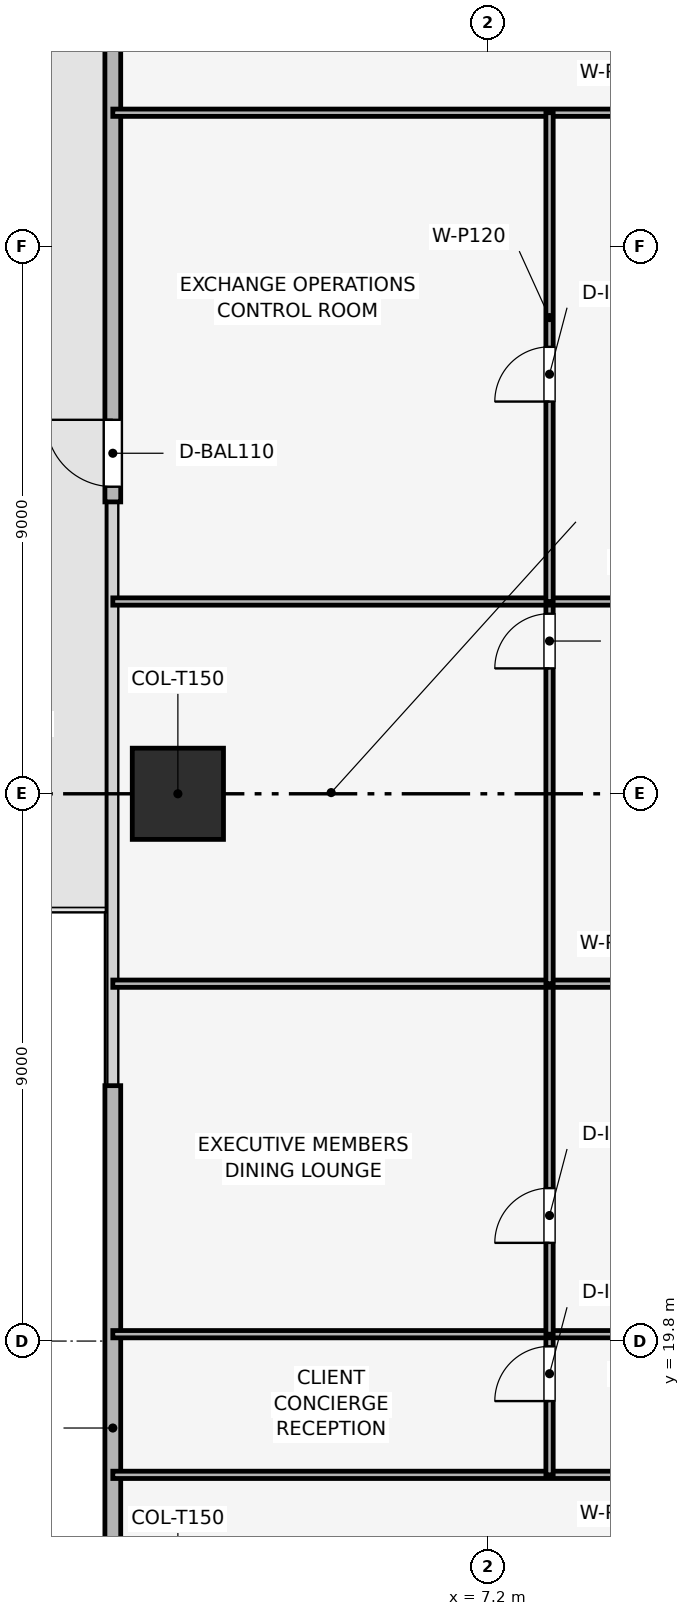
"""IFC4 building model, lengths in metres.
Left out: names, types, materials, properties, quantities, classifications, styles, units other than length and angle.
Written with IfcOpenShell. Run it as: python <this file> out.ifc"""

import sys

from ifc_helpers import new_model, si_unit, direction, frame, frame_2d, origin, origin_2d, place, context, subcontext, project, spatial, rectangle, extrude, element, fill, save


model = new_model("IFC4")
c1 = context("Model", 3, precision=1e-05, world=origin(), true_north=direction((0.0, 1.0)))
c2 = subcontext(c1, "Body", "Model", "MODEL_VIEW")
j1 = project(units=[si_unit("LENGTHUNIT", "METRE"), si_unit("PLANEANGLEUNIT", "RADIAN")], contexts=[c1])
p1 = place(None, origin())
s1 = spatial("IfcSite", under=j1, at=p1, CompositionType="ELEMENT")
p2 = place(p1, origin())
s2 = spatial("IfcBuilding", under=s1, at=p2, CompositionType="ELEMENT")
p3 = place(p2, frame((0.0, 0.0, 53.4)))
s3 = spatial("IfcBuildingStorey", under=s2, at=p3, CompositionType="ELEMENT", Elevation=53.4)
p4 = place(p3, frame((2.1, 28.8, 0.003), z_axis=(0.0, 0.0, 1.0), x_axis=(1.0, 0.0, 0.0)))
e1 = element("IfcColumn", 1, at=p4, inside=s3, PredefinedType="COLUMN", context=c2, shape_type="SweptSolid", body=[
    extrude(rectangle(XDim=1.5, YDim=1.5, at=origin_2d()), origin(), (0.0, 0.0, 1.0), 3.644),
])
p5 = place(p3, frame((1.03, 8.7, 0.0), z_axis=(0.0, 0.0, 1.0), x_axis=(0.0, 1.0, 0.0)))
e2 = element("IfcWall", 2, at=p5, inside=s3, PredefinedType="SOLIDWALL", context=c2, shape_type="SweptSolid", body=[
    extrude(rectangle(XDim=15.3, YDim=0.26, at=frame_2d((7.65, 0.0))), origin(), (0.0, 0.0, 1.0), 3.65),
])
p6 = place(p5, frame((0.25, 0.0, 0.9)))
e3 = element("IfcOpeningElement", 3, at=p6, cuts=e2, PredefinedType="OPENING", context=c2, shape_type="SweptSolid", body=[
    extrude(rectangle(XDim=3.8, YDim=1.9, at=frame_2d((1.9, 0.95))), frame((0.0, 0.14, 0.0), z_axis=(0.0, -1.0, 0.0), x_axis=(1.0, 0.0, 0.0)), (0.0, 0.0, 1.0), 0.28),
])
p7 = place(p3, frame((1.03, 33.6, 0.0), z_axis=(0.0, 0.0, 1.0), x_axis=(0.0, 1.0, 0.0)))
e4 = element("IfcWall", 4, at=p7, inside=s3, PredefinedType="SOLIDWALL", context=c2, shape_type="SweptSolid", body=[
    extrude(rectangle(XDim=15.3, YDim=0.26, at=frame_2d((7.65, 0.0))), origin(), (0.0, 0.0, 1.0), 3.65),
])
p8 = place(p7, frame((0.25, 0.0, 0.0)))
e5 = element("IfcOpeningElement", 5, at=p8, cuts=e4, PredefinedType="OPENING", context=c2, shape_type="SweptSolid", body=[
    extrude(rectangle(XDim=1.1, YDim=2.2, at=frame_2d((0.55, 1.1))), frame((0.0, 0.14, 0.0), z_axis=(0.0, -1.0, 0.0), x_axis=(1.0, 0.0, 0.0)), (0.0, 0.0, 1.0), 0.28),
])
for number, where, z_axis, x_axis in (
    (6, (1.03, 17.6, 0.0), (0.0, 0.0, 1.0), (1.0, 0.0, 0.0)),
    (7, (1.03, 40.0, 0.0), (0.0, 0.0, 1.0), (1.0, 0.0, 0.0)),
):
    element("IfcWall", number, at=place(p3, frame(where, z_axis=z_axis, x_axis=x_axis)), inside=s3, PredefinedType="PARTITIONING", context=c2, shape_type="SweptSolid", body=[
        extrude(rectangle(XDim=16.57, YDim=0.12, at=frame_2d((8.285, 0.0))), origin(), (0.0, 0.0, 1.0), 2.935),
    ])
p9 = place(p3, frame((8.212, 17.6, 0.0), z_axis=(0.0, 0.0, 1.0), x_axis=(0.0, 1.0, 0.0)))
e8 = element("IfcWall", 8, at=p9, inside=s3, PredefinedType="PARTITIONING", context=c2, shape_type="SweptSolid", body=[
    extrude(rectangle(XDim=2.313, YDim=0.12, at=frame_2d((1.156, 0.0))), origin(), (0.0, 0.0, 1.0), 3.65),
])
p10 = place(p9, frame((1.213, 0.0, 0.0)))
e9 = element("IfcOpeningElement", 9, at=p10, cuts=e8, PredefinedType="OPENING", context=c2, shape_type="SweptSolid", body=[
    extrude(rectangle(XDim=0.9, YDim=2.1, at=frame_2d((0.45, 1.05))), frame((0.0, 0.07, 0.0), z_axis=(0.0, -1.0, 0.0), x_axis=(1.0, 0.0, 0.0)), (0.0, 0.0, 1.0), 0.14),
])
p11 = place(p3, frame((1.03, 19.913, 0.0), z_axis=(0.0, 0.0, 1.0), x_axis=(1.0, 0.0, 0.0)))
e10 = element("IfcWall", 10, at=p11, inside=s3, PredefinedType="PARTITIONING", context=c2, shape_type="SweptSolid", body=[
    extrude(rectangle(XDim=16.57, YDim=0.12, at=frame_2d((8.285, 0.0))), origin(), (0.0, 0.0, 1.0), 2.935),
])
p12 = place(p3, frame((8.212, 19.913, 0.0), z_axis=(0.0, 0.0, 1.0), x_axis=(0.0, 1.0, 0.0)))
e11 = element("IfcWall", 11, at=p12, inside=s3, PredefinedType="PARTITIONING", context=c2, shape_type="SweptSolid", body=[
    extrude(rectangle(XDim=5.764, YDim=0.12, at=frame_2d((2.882, 0.0))), origin(), (0.0, 0.0, 1.0), 3.085),
])
p13 = place(p12, frame((1.502, 0.0, 0.0)))
e12 = element("IfcOpeningElement", 12, at=p13, cuts=e11, PredefinedType="OPENING", context=c2, shape_type="SweptSolid", body=[
    extrude(rectangle(XDim=0.9, YDim=2.1, at=frame_2d((0.45, 1.05))), frame((0.0, 0.07, 0.0), z_axis=(0.0, -1.0, 0.0), x_axis=(1.0, 0.0, 0.0)), (0.0, 0.0, 1.0), 0.14),
])
p14 = place(p3, frame((1.03, 25.677, 0.0), z_axis=(0.0, 0.0, 1.0), x_axis=(1.0, 0.0, 0.0)))
e13 = element("IfcWall", 13, at=p14, inside=s3, PredefinedType="PARTITIONING", context=c2, shape_type="SweptSolid", body=[
    extrude(rectangle(XDim=16.57, YDim=0.12, at=frame_2d((8.285, 0.0))), origin(), (0.0, 0.0, 1.0), 2.935),
])
p15 = place(p3, frame((8.212, 25.677, 0.0), z_axis=(0.0, 0.0, 1.0), x_axis=(0.0, 1.0, 0.0)))
e14 = element("IfcWall", 14, at=p15, inside=s3, PredefinedType="PARTITIONING", context=c2, shape_type="SweptSolid", body=[
    extrude(rectangle(XDim=6.285, YDim=0.12, at=frame_2d((3.143, 0.0))), origin(), (0.0, 0.0, 1.0), 3.085),
])
p16 = place(p15, frame((5.185, 0.0, 0.0)))
e15 = element("IfcOpeningElement", 15, at=p16, cuts=e14, PredefinedType="OPENING", context=c2, shape_type="SweptSolid", body=[
    extrude(rectangle(XDim=0.9, YDim=2.1, at=frame_2d((0.45, 1.05))), frame((0.0, 0.07, 0.0), z_axis=(0.0, -1.0, 0.0), x_axis=(1.0, 0.0, 0.0)), (0.0, 0.0, 1.0), 0.14),
])
p17 = place(p3, frame((1.03, 31.962, 0.0), z_axis=(0.0, 0.0, 1.0), x_axis=(1.0, 0.0, 0.0)))
e16 = element("IfcWall", 16, at=p17, inside=s3, PredefinedType="PARTITIONING", context=c2, shape_type="SweptSolid", body=[
    extrude(rectangle(XDim=16.57, YDim=0.12, at=frame_2d((8.285, 0.0))), origin(), (0.0, 0.0, 1.0), 2.935),
])
p18 = place(p3, frame((8.212, 31.962, 0.0), z_axis=(0.0, 0.0, 1.0), x_axis=(0.0, 1.0, 0.0)))
e17 = element("IfcWall", 17, at=p18, inside=s3, PredefinedType="PARTITIONING", context=c2, shape_type="SweptSolid", body=[
    extrude(rectangle(XDim=8.038, YDim=0.12, at=frame_2d((4.019, 0.0))), origin(), (0.0, 0.0, 1.0), 3.085),
])
p19 = place(p18, frame((3.288, 0.0, 0.0)))
e18 = element("IfcOpeningElement", 18, at=p19, cuts=e17, PredefinedType="OPENING", context=c2, shape_type="SweptSolid", body=[
    extrude(rectangle(XDim=0.9, YDim=2.1, at=frame_2d((0.45, 1.05))), frame((0.0, 0.07, 0.0), z_axis=(0.0, -1.0, 0.0), x_axis=(1.0, 0.0, 0.0)), (0.0, 0.0, 1.0), 0.14),
])
p20 = place(p8, origin())
e19 = element("IfcDoor", 19, at=p20, inside=s3, OperationType="SINGLE_SWING_RIGHT", PredefinedType="DOOR", context=c2, shape_type="SweptSolid", body=[
    extrude(rectangle(XDim=1.1, YDim=2.2, at=frame_2d((0.55, 1.1))), frame((0.0, 0.025, 0.0), z_axis=(0.0, -1.0, 0.0), x_axis=(1.0, 0.0, 0.0)), (0.0, 0.0, 1.0), 0.05),
])
fill(e5, e19)
p21 = place(p10, origin())
e20 = element("IfcDoor", 20, at=p21, inside=s3, OperationType="SINGLE_SWING_LEFT", PredefinedType="DOOR", context=c2, shape_type="SweptSolid", body=[
    extrude(rectangle(XDim=0.9, YDim=2.1, at=frame_2d((0.45, 1.05))), frame((0.0, 0.025, 0.0), z_axis=(0.0, -1.0, 0.0), x_axis=(1.0, 0.0, 0.0)), (0.0, 0.0, 1.0), 0.05),
])
fill(e9, e20)
p22 = place(p13, origin())
e21 = element("IfcDoor", 21, at=p22, inside=s3, OperationType="SINGLE_SWING_LEFT", PredefinedType="DOOR", context=c2, shape_type="SweptSolid", body=[
    extrude(rectangle(XDim=0.9, YDim=2.1, at=frame_2d((0.45, 1.05))), frame((0.0, 0.025, 0.0), z_axis=(0.0, -1.0, 0.0), x_axis=(1.0, 0.0, 0.0)), (0.0, 0.0, 1.0), 0.05),
])
fill(e12, e21)
p23 = place(p16, origin())
e22 = element("IfcDoor", 22, at=p23, inside=s3, OperationType="SINGLE_SWING_LEFT", PredefinedType="DOOR", context=c2, shape_type="SweptSolid", body=[
    extrude(rectangle(XDim=0.9, YDim=2.1, at=frame_2d((0.45, 1.05))), frame((0.0, 0.025, 0.0), z_axis=(0.0, -1.0, 0.0), x_axis=(1.0, 0.0, 0.0)), (0.0, 0.0, 1.0), 0.05),
])
fill(e15, e22)
p24 = place(p19, origin())
e23 = element("IfcDoor", 23, at=p24, inside=s3, OperationType="SINGLE_SWING_LEFT", PredefinedType="DOOR", context=c2, shape_type="SweptSolid", body=[
    extrude(rectangle(XDim=0.9, YDim=2.1, at=frame_2d((0.45, 1.05))), frame((0.0, 0.025, 0.0), z_axis=(0.0, -1.0, 0.0), x_axis=(1.0, 0.0, 0.0)), (0.0, 0.0, 1.0), 0.05),
])
fill(e18, e23)
save(model, sys.argv[1])
